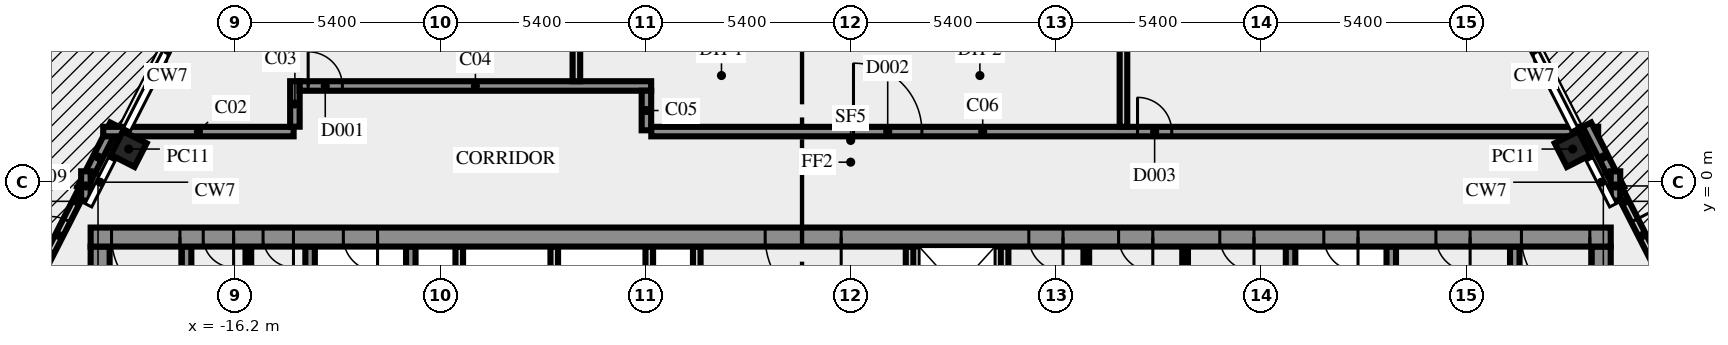
"""IFC4 building model, lengths in metres.
Left out: names, types, materials, properties, quantities, classifications, styles, units other than length and angle.
Written with IfcOpenShell. Run it as: python <this file> out.ifc"""

import sys

from ifc_helpers import new_model, si_unit, direction, frame, frame_2d, origin, origin_2d, place, context, subcontext, project, spatial, rectangle, extrude, element, fill, save


model = new_model("IFC4")
c1 = context("Model", 3, precision=1e-05, world=origin(), true_north=direction((0.0, 1.0)))
c2 = subcontext(c1, "Body", "Model", "MODEL_VIEW")
j1 = project(units=[si_unit("LENGTHUNIT", "METRE"), si_unit("PLANEANGLEUNIT", "RADIAN")], contexts=[c1])
p1 = place(None, origin())
s1 = spatial("IfcSite", under=j1, at=p1, CompositionType="ELEMENT")
p2 = place(p1, origin())
s2 = spatial("IfcBuilding", under=s1, at=p2, CompositionType="ELEMENT")
p3 = place(p2, frame((0.0, 0.0, 355.0)))
s3 = spatial("IfcBuildingStorey", under=s2, at=p3, CompositionType="ELEMENT", Elevation=355.0)
for number, where, z_axis, x_axis in (
    (1, (-18.998, 0.865, 0.0), (0.0, 0.0, 1.0), (-0.454, -0.891, 0.0)),
    (2, (18.998, 0.865, 0.0), (0.0, 0.0, 1.0), (-0.454, 0.891, 0.0)),
):
    element("IfcColumn", number, at=place(p3, frame(where, z_axis=z_axis, x_axis=x_axis)), inside=s3, PredefinedType="COLUMN", context=c2, shape_type="SweptSolid", body=[
        extrude(rectangle(XDim=0.7, YDim=0.7, at=origin_2d()), origin(), (0.0, 0.0, 1.0), 7.55),
    ])
p4 = place(p3, frame((-21.312, -2.355, 0.0), z_axis=(0.0, 0.0, 1.0), x_axis=(0.453964632037, 0.891019703968, 0.0)))
e3 = element("IfcWall", 3, at=p4, inside=s3, PredefinedType="SOLIDWALL", context=c2, shape_type="SweptSolid", body=[
    extrude(rectangle(XDim=2.354, YDim=0.2, at=frame_2d((1.177, 0.0))), origin(), (0.0, 0.0, 1.0), 7.55),
])
p5 = place(p4, frame((0.611, 0.0, 0.0)))
e4 = element("IfcOpeningElement", 4, at=p5, cuts=e3, PredefinedType="OPENING", context=c2, shape_type="SweptSolid", body=[
    extrude(rectangle(XDim=0.9, YDim=2.1, at=frame_2d((0.45, 1.05))), frame((0.0, 0.11, 0.0), z_axis=(0.0, -1.0, 0.0), x_axis=(1.0, 0.0, 0.0)), (0.0, 0.0, 1.0), 0.22),
])
p6 = place(p3, frame((20.244, -0.258, 0.0), z_axis=(0.0, 0.0, 1.0), x_axis=(0.453964632037, -0.891019703968, 0.0)))
e5 = element("IfcWall", 5, at=p6, inside=s3, PredefinedType="SOLIDWALL", context=c2, shape_type="SweptSolid", body=[
    extrude(rectangle(XDim=2.354, YDim=0.2, at=frame_2d((1.177, 0.0))), origin(), (0.0, 0.0, 1.0), 7.55),
])
p7 = place(p6, frame((0.843, 0.0, 0.0)))
e6 = element("IfcOpeningElement", 6, at=p7, cuts=e5, PredefinedType="OPENING", context=c2, shape_type="SweptSolid", body=[
    extrude(rectangle(XDim=0.9, YDim=2.1, at=frame_2d((0.45, 1.05))), frame((0.0, 0.11, 0.0), z_axis=(0.0, -1.0, 0.0), x_axis=(1.0, 0.0, 0.0)), (0.0, 0.0, 1.0), 0.22),
])
for number, where, z_axis, x_axis in (
    (7, (-19.75, -10.5, 0.0), (0.0, 0.0, 1.0), (0.0, 1.0, 0.0)),
    (8, (19.75, -10.5, 0.0), (0.0, 0.0, 1.0), (0.0, 1.0, 0.0)),
):
    element("IfcWall", number, at=place(p3, frame(where, z_axis=z_axis, x_axis=x_axis)), inside=s3, PredefinedType="SHEAR", context=c2, shape_type="SweptSolid", body=[
        extrude(rectangle(XDim=8.8, YDim=0.5, at=frame_2d((4.4, 0.0))), origin(), (0.0, 0.0, 1.0), 7.55),
    ])
for number, where, z_axis, x_axis in (
    (9, (-17.475, -6.0, 0.0), (0.0, 0.0, 1.0), (0.0, 1.0, 0.0)),
    (10, (-14.225, -6.0, 0.0), (0.0, 0.0, 1.0), (0.0, 1.0, 0.0)),
    (11, (14.225, -6.0, 0.0), (0.0, 0.0, 1.0), (0.0, 1.0, 0.0)),
    (12, (17.475, -6.0, 0.0), (0.0, 0.0, 1.0), (0.0, 1.0, 0.0)),
):
    element("IfcWall", number, at=place(p3, frame(where, z_axis=z_axis, x_axis=x_axis)), inside=s3, PredefinedType="SHEAR", context=c2, shape_type="SweptSolid", body=[
        extrude(rectangle(XDim=4.3, YDim=0.25, at=frame_2d((2.15, 0.0))), origin(), (0.0, 0.0, 1.0), 7.55),
    ])
p8 = place(p3, frame((-11.575, -4.0, 0.0), z_axis=(0.0, 0.0, 1.0), x_axis=(0.0, 1.0, 0.0)))
e13 = element("IfcWall", 13, at=p8, inside=s3, PredefinedType="SHEAR", context=c2, shape_type="SweptSolid", body=[
    extrude(rectangle(XDim=2.3, YDim=0.25, at=frame_2d((1.15, 0.0))), origin(), (0.0, 0.0, 1.0), 7.55),
])
for number, where, z_axis, x_axis in (
    (14, (-10.3, -4.0, 0.0), (0.0, 0.0, 1.0), (0.0, 1.0, 0.0)),
    (15, (-7.8, -4.0, 0.0), (0.0, 0.0, 1.0), (0.0, 1.0, 0.0)),
    (16, (-5.3, -4.0, 0.0), (0.0, 0.0, 1.0), (0.0, 1.0, 0.0)),
    (17, (-4.05, -4.0, 0.0), (0.0, 0.0, 1.0), (0.0, 1.0, 0.0)),
    (18, (1.55, -4.0, 0.0), (0.0, 0.0, 1.0), (0.0, 1.0, 0.0)),
    (19, (4.05, -4.0, 0.0), (0.0, 0.0, 1.0), (0.0, 1.0, 0.0)),
):
    element("IfcWall", number, at=place(p3, frame(where, z_axis=z_axis, x_axis=x_axis)), inside=s3, PredefinedType="SOLIDWALL", context=c2, shape_type="SweptSolid", body=[
        extrude(rectangle(XDim=2.3, YDim=0.2, at=frame_2d((1.15, 0.0))), origin(), (0.0, 0.0, 1.0), 7.55),
    ])
for number, where, z_axis, x_axis in (
    (20, (6.2, -4.0, 0.0), (0.0, 0.0, 1.0), (0.0, 1.0, 0.0)),
    (21, (8.8, -4.0, 0.0), (0.0, 0.0, 1.0), (0.0, 1.0, 0.0)),
):
    element("IfcWall", number, at=place(p3, frame(where, z_axis=z_axis, x_axis=x_axis)), inside=s3, PredefinedType="PARTITIONING", context=c2, shape_type="SweptSolid", body=[
        extrude(rectangle(XDim=2.3, YDim=0.15, at=frame_2d((1.15, 0.0))), origin(), (0.0, 0.0, 1.0), 7.55),
    ])
p9 = place(p3, frame((11.575, -4.0, 0.0), z_axis=(0.0, 0.0, 1.0), x_axis=(0.0, 1.0, 0.0)))
e22 = element("IfcWall", 22, at=p9, inside=s3, PredefinedType="SHEAR", context=c2, shape_type="SweptSolid", body=[
    extrude(rectangle(XDim=2.3, YDim=0.25, at=frame_2d((1.15, 0.0))), origin(), (0.0, 0.0, 1.0), 7.55),
])
p10 = place(p3, frame((-15.85, -3.35, 0.0), z_axis=(0.0, 0.0, 1.0), x_axis=(0.0, 1.0, 0.0)))
e23 = element("IfcWall", 23, at=p10, inside=s3, PredefinedType="PARTITIONING", context=c2, shape_type="SweptSolid", body=[
    extrude(rectangle(XDim=1.65, YDim=0.15, at=frame_2d((0.825, 0.0))), origin(), (0.0, 0.0, 1.0), 7.55),
])
p11 = place(p3, frame((20.0, -1.45, 0.0), z_axis=(0.0, 0.0, 1.0), x_axis=(-1.0, 0.0, 0.0)))
e24 = element("IfcWall", 24, at=p11, inside=s3, PredefinedType="SHEAR", context=c2, shape_type="SweptSolid", body=[
    extrude(rectangle(XDim=40.0, YDim=0.5, at=frame_2d((20.0, 0.0))), origin(), (0.0, 0.0, 1.0), 7.55),
])
p12 = place(p11, frame((37.65, 0.0, 0.0)))
e25 = element("IfcOpeningElement", 25, at=p12, cuts=e24, PredefinedType="OPENING", context=c2, shape_type="SweptSolid", body=[
    extrude(rectangle(XDim=1.8, YDim=2.1, at=frame_2d((0.9, 1.05))), frame((0.0, 0.26, 0.0), z_axis=(0.0, -1.0, 0.0), x_axis=(1.0, 0.0, 0.0)), (0.0, 0.0, 1.0), 0.52),
])
p13 = place(p11, frame((36.238, 0.0, 0.0)))
e26 = element("IfcOpeningElement", 26, at=p13, cuts=e24, PredefinedType="OPENING", context=c2, shape_type="SweptSolid", body=[
    extrude(rectangle(XDim=0.8, YDim=2.1, at=frame_2d((0.4, 1.05))), frame((0.0, 0.26, 0.0), z_axis=(0.0, -1.0, 0.0), x_axis=(1.0, 0.0, 0.0)), (0.0, 0.0, 1.0), 0.52),
])
p14 = place(p11, frame((34.663, 0.0, 0.0)))
e27 = element("IfcOpeningElement", 27, at=p14, cuts=e24, PredefinedType="OPENING", context=c2, shape_type="SweptSolid", body=[
    extrude(rectangle(XDim=0.8, YDim=2.1, at=frame_2d((0.4, 1.05))), frame((0.0, 0.26, 0.0), z_axis=(0.0, -1.0, 0.0), x_axis=(1.0, 0.0, 0.0)), (0.0, 0.0, 1.0), 0.52),
])
p15 = place(p11, frame((32.45, 0.0, 0.0)))
e28 = element("IfcOpeningElement", 28, at=p15, cuts=e24, PredefinedType="OPENING", context=c2, shape_type="SweptSolid", body=[
    extrude(rectangle(XDim=0.9, YDim=2.1, at=frame_2d((0.45, 1.05))), frame((0.0, 0.26, 0.0), z_axis=(0.0, -1.0, 0.0), x_axis=(1.0, 0.0, 0.0)), (0.0, 0.0, 1.0), 0.52),
])
p16 = place(p11, frame((20.25, 0.0, 0.0)))
e29 = element("IfcOpeningElement", 29, at=p16, cuts=e24, PredefinedType="OPENING", context=c2, shape_type="SweptSolid", body=[
    extrude(rectangle(XDim=2.0, YDim=2.1, at=frame_2d((1.0, 1.05))), frame((0.0, 0.26, 0.0), z_axis=(0.0, -1.0, 0.0), x_axis=(1.0, 0.0, 0.0)), (0.0, 0.0, 1.0), 0.52),
])
p17 = place(p11, frame((14.413, 0.0, 0.0)))
e30 = element("IfcOpeningElement", 30, at=p17, cuts=e24, PredefinedType="OPENING", context=c2, shape_type="SweptSolid", body=[
    extrude(rectangle(XDim=0.9, YDim=2.1, at=frame_2d((0.45, 1.05))), frame((0.0, 0.26, 0.0), z_axis=(0.0, -1.0, 0.0), x_axis=(1.0, 0.0, 0.0)), (0.0, 0.0, 1.0), 0.52),
])
p18 = place(p11, frame((12.05, 0.0, 0.0)))
e31 = element("IfcOpeningElement", 31, at=p18, cuts=e24, PredefinedType="OPENING", context=c2, shape_type="SweptSolid", body=[
    extrude(rectangle(XDim=0.9, YDim=2.1, at=frame_2d((0.45, 1.05))), frame((0.0, 0.26, 0.0), z_axis=(0.0, -1.0, 0.0), x_axis=(1.0, 0.0, 0.0)), (0.0, 0.0, 1.0), 0.52),
])
p19 = place(p11, frame((9.387, 0.0, 0.0)))
e32 = element("IfcOpeningElement", 32, at=p19, cuts=e24, PredefinedType="OPENING", context=c2, shape_type="SweptSolid", body=[
    extrude(rectangle(XDim=0.9, YDim=2.1, at=frame_2d((0.45, 1.05))), frame((0.0, 0.26, 0.0), z_axis=(0.0, -1.0, 0.0), x_axis=(1.0, 0.0, 0.0)), (0.0, 0.0, 1.0), 0.52),
])
p20 = place(p11, frame((6.65, 0.0, 0.0)))
e33 = element("IfcOpeningElement", 33, at=p20, cuts=e24, PredefinedType="OPENING", context=c2, shape_type="SweptSolid", body=[
    extrude(rectangle(XDim=0.9, YDim=2.1, at=frame_2d((0.45, 1.05))), frame((0.0, 0.26, 0.0), z_axis=(0.0, -1.0, 0.0), x_axis=(1.0, 0.0, 0.0)), (0.0, 0.0, 1.0), 0.52),
])
p21 = place(p11, frame((3.7, 0.0, 0.0)))
e34 = element("IfcOpeningElement", 34, at=p21, cuts=e24, PredefinedType="OPENING", context=c2, shape_type="SweptSolid", body=[
    extrude(rectangle(XDim=0.9, YDim=2.1, at=frame_2d((0.45, 1.05))), frame((0.0, 0.26, 0.0), z_axis=(0.0, -1.0, 0.0), x_axis=(1.0, 0.0, 0.0)), (0.0, 0.0, 1.0), 0.52),
])
p22 = place(p11, frame((0.55, 0.0, 0.0)))
e35 = element("IfcOpeningElement", 35, at=p22, cuts=e24, PredefinedType="OPENING", context=c2, shape_type="SweptSolid", body=[
    extrude(rectangle(XDim=1.8, YDim=2.1, at=frame_2d((0.9, 1.05))), frame((0.0, 0.26, 0.0), z_axis=(0.0, -1.0, 0.0), x_axis=(1.0, 0.0, 0.0)), (0.0, 0.0, 1.0), 0.52),
])
p23 = place(p3, frame((-20.239, -0.193, 0.0), z_axis=(0.0, 0.0, 1.0), x_axis=(0.454061930084, 0.890970125003, 0.0)))
e36 = element("IfcWall", 36, at=p23, inside=s3, PredefinedType="SOLIDWALL", context=c2, shape_type="SweptSolid", body=[
    extrude(rectangle(XDim=1.907, YDim=0.25, at=frame_2d((0.954, 0.0))), origin(), (0.0, 0.0, 1.0), 7.55),
])
p24 = place(p3, frame((-19.669, 1.325, 0.0), z_axis=(0.0, 0.0, 1.0), x_axis=(1.0, 0.0, 0.0)))
e37 = element("IfcWall", 37, at=p24, inside=s3, PredefinedType="SOLIDWALL", context=c2, shape_type="SweptSolid", body=[
    extrude(rectangle(XDim=5.01, YDim=0.25, at=frame_2d((2.505, 0.0))), origin(), (0.0, 0.0, 1.0), 7.55),
])
p25 = place(p3, frame((-14.625, 1.454, 0.0), z_axis=(0.0, 0.0, 1.0), x_axis=(0.0, 1.0, 0.0)))
e38 = element("IfcWall", 38, at=p25, inside=s3, PredefinedType="SOLIDWALL", context=c2, shape_type="SweptSolid", body=[
    extrude(rectangle(XDim=1.196, YDim=0.25, at=frame_2d((0.598, 0.0))), origin(), (0.0, 0.0, 1.0), 7.55),
])
p26 = place(p3, frame((-14.5, 2.525, 0.0), z_axis=(0.0, 0.0, 1.0), x_axis=(1.0, 0.0, 0.0)))
e39 = element("IfcWall", 39, at=p26, inside=s3, PredefinedType="SOLIDWALL", context=c2, shape_type="SweptSolid", body=[
    extrude(rectangle(XDim=9.25, YDim=0.25, at=frame_2d((4.625, 0.0))), origin(), (0.0, 0.0, 1.0), 7.55),
])
p27 = place(p26, frame((0.224, 0.0, 0.0)))
e40 = element("IfcOpeningElement", 40, at=p27, cuts=e39, PredefinedType="OPENING", context=c2, shape_type="SweptSolid", body=[
    extrude(rectangle(XDim=0.9, YDim=2.1, at=frame_2d((0.45, 1.05))), frame((0.0, 0.135, 0.0), z_axis=(0.0, -1.0, 0.0), x_axis=(1.0, 0.0, 0.0)), (0.0, 0.0, 1.0), 0.27),
])
p28 = place(p3, frame((-5.375, 2.4, 0.0), z_axis=(0.0, 0.0, 1.0), x_axis=(0.0, -1.0, 0.0)))
e41 = element("IfcWall", 41, at=p28, inside=s3, PredefinedType="SOLIDWALL", context=c2, shape_type="SweptSolid", body=[
    extrude(rectangle(XDim=1.041, YDim=0.25, at=frame_2d((0.521, 0.0))), origin(), (0.0, 0.0, 1.0), 7.55),
])
p29 = place(p3, frame((-5.246, 1.325, 0.0), z_axis=(0.0, 0.0, 1.0), x_axis=(1.0, 0.0, 0.0)))
e42 = element("IfcWall", 42, at=p29, inside=s3, PredefinedType="SOLIDWALL", context=c2, shape_type="SweptSolid", body=[
    extrude(rectangle(XDim=24.916, YDim=0.25, at=frame_2d((12.458, 0.0))), origin(), (0.0, 0.0, 1.0), 7.55),
])
p30 = place(p29, frame((5.32, 0.0, 0.0)))
e43 = element("IfcOpeningElement", 43, at=p30, cuts=e42, PredefinedType="OPENING", context=c2, shape_type="SweptSolid", body=[
    extrude(rectangle(XDim=1.8, YDim=2.1, at=frame_2d((0.9, 1.05))), frame((0.0, 0.135, 0.0), z_axis=(0.0, -1.0, 0.0), x_axis=(1.0, 0.0, 0.0)), (0.0, 0.0, 1.0), 0.27),
])
p31 = place(p29, frame((12.794, 0.0, 0.0)))
e44 = element("IfcOpeningElement", 44, at=p31, cuts=e42, PredefinedType="OPENING", context=c2, shape_type="SweptSolid", body=[
    extrude(rectangle(XDim=0.9, YDim=2.1, at=frame_2d((0.45, 1.05))), frame((0.0, 0.135, 0.0), z_axis=(0.0, -1.0, 0.0), x_axis=(1.0, 0.0, 0.0)), (0.0, 0.0, 1.0), 0.27),
])
p32 = place(p3, frame((19.373, 1.507, 0.0), z_axis=(0.0, 0.0, 1.0), x_axis=(0.454061930084, -0.890970125003, 0.0)))
e45 = element("IfcWall", 45, at=p32, inside=s3, PredefinedType="SOLIDWALL", context=c2, shape_type="SweptSolid", body=[
    extrude(rectangle(XDim=1.907, YDim=0.25, at=frame_2d((0.954, 0.0))), origin(), (0.0, 0.0, 1.0), 7.55),
])
for number, where, z_axis, x_axis in (
    (46, (20.125, 0.28, 0.0), (0.0, 0.0, 1.0), (0.0, -1.0, 0.0)),
    (47, (-20.125, -0.491, 0.0), (0.0, 0.0, 1.0), (0.0, 1.0, 0.0)),
):
    element("IfcWall", number, at=place(p3, frame(where, z_axis=z_axis, x_axis=x_axis)), inside=s3, PredefinedType="SOLIDWALL", context=c2, shape_type="SweptSolid", body=[
        extrude(rectangle(XDim=0.771, YDim=0.25, at=frame_2d((0.386, 0.0))), origin(), (0.0, 0.0, 1.0), 7.55),
    ])
p33 = place(p3, frame((-7.218, 2.65, 0.0), z_axis=(0.0, 0.0, 1.0), x_axis=(0.0, 1.0, 0.0)))
e48 = element("IfcWall", 48, at=p33, inside=s3, PredefinedType="SOLIDWALL", context=c2, shape_type="SweptSolid", body=[
    extrude(rectangle(XDim=8.026, YDim=0.2, at=frame_2d((4.013, 0.0))), origin(), (0.0, 0.0, 1.0), 5.75),
])
p34 = place(p3, frame((7.178, 1.45, 0.0), z_axis=(0.0, 0.0, 1.0), x_axis=(0.0, 1.0, 0.0)))
e49 = element("IfcWall", 49, at=p34, inside=s3, PredefinedType="SOLIDWALL", context=c2, shape_type="SweptSolid", body=[
    extrude(rectangle(XDim=9.226, YDim=0.2, at=frame_2d((4.613, 0.0))), origin(), (0.0, 0.0, 1.0), 5.75),
])
p35 = place(p5, origin())
e50 = element("IfcDoor", 50, at=p35, inside=s3, OperationType="SINGLE_SWING_RIGHT", PredefinedType="DOOR", context=c2, shape_type="SweptSolid", body=[
    extrude(rectangle(XDim=0.9, YDim=2.1, at=frame_2d((0.45, 1.05))), frame((0.0, 0.025, 0.0), z_axis=(0.0, -1.0, 0.0), x_axis=(1.0, 0.0, 0.0)), (0.0, 0.0, 1.0), 0.05),
])
fill(e4, e50)
p36 = place(p7, origin())
e51 = element("IfcDoor", 51, at=p36, inside=s3, OperationType="SINGLE_SWING_RIGHT", PredefinedType="DOOR", context=c2, shape_type="SweptSolid", body=[
    extrude(rectangle(XDim=0.9, YDim=2.1, at=frame_2d((0.45, 1.05))), frame((0.0, 0.025, 0.0), z_axis=(0.0, -1.0, 0.0), x_axis=(1.0, 0.0, 0.0)), (0.0, 0.0, 1.0), 0.05),
])
fill(e6, e51)
p37 = place(p12, origin())
e52 = element("IfcDoor", 52, at=p37, inside=s3, OperationType="DOUBLE_DOOR_SINGLE_SWING", PredefinedType="DOOR", context=c2, shape_type="SweptSolid", body=[
    extrude(rectangle(XDim=1.8, YDim=2.1, at=frame_2d((0.9, 1.05))), frame((0.0, 0.025, 0.0), z_axis=(0.0, -1.0, 0.0), x_axis=(1.0, 0.0, 0.0)), (0.0, 0.0, 1.0), 0.05),
])
fill(e25, e52)
p38 = place(p13, origin())
e53 = element("IfcDoor", 53, at=p38, inside=s3, OperationType="SINGLE_SWING_RIGHT", PredefinedType="DOOR", context=c2, shape_type="SweptSolid", body=[
    extrude(rectangle(XDim=0.8, YDim=2.1, at=frame_2d((0.4, 1.05))), frame((0.0, 0.025, 0.0), z_axis=(0.0, -1.0, 0.0), x_axis=(1.0, 0.0, 0.0)), (0.0, 0.0, 1.0), 0.05),
])
fill(e26, e53)
p39 = place(p14, origin())
e54 = element("IfcDoor", 54, at=p39, inside=s3, OperationType="SINGLE_SWING_RIGHT", PredefinedType="DOOR", context=c2, shape_type="SweptSolid", body=[
    extrude(rectangle(XDim=0.8, YDim=2.1, at=frame_2d((0.4, 1.05))), frame((0.0, 0.025, 0.0), z_axis=(0.0, -1.0, 0.0), x_axis=(1.0, 0.0, 0.0)), (0.0, 0.0, 1.0), 0.05),
])
fill(e27, e54)
p40 = place(p15, origin())
e55 = element("IfcDoor", 55, at=p40, inside=s3, OperationType="SINGLE_SWING_RIGHT", PredefinedType="DOOR", context=c2, shape_type="SweptSolid", body=[
    extrude(rectangle(XDim=0.9, YDim=2.1, at=frame_2d((0.45, 1.05))), frame((0.0, 0.025, 0.0), z_axis=(0.0, -1.0, 0.0), x_axis=(1.0, 0.0, 0.0)), (0.0, 0.0, 1.0), 0.05),
])
fill(e28, e55)
p41 = place(p16, origin())
e56 = element("IfcDoor", 56, at=p41, inside=s3, OperationType="DOUBLE_DOOR_SINGLE_SWING", PredefinedType="DOOR", context=c2, shape_type="SweptSolid", body=[
    extrude(rectangle(XDim=2.0, YDim=2.1, at=frame_2d((1.0, 1.05))), frame((0.0, 0.025, 0.0), z_axis=(0.0, -1.0, 0.0), x_axis=(1.0, 0.0, 0.0)), (0.0, 0.0, 1.0), 0.05),
])
fill(e29, e56)
p42 = place(p17, origin())
e57 = element("IfcDoor", 57, at=p42, inside=s3, OperationType="SINGLE_SWING_LEFT", PredefinedType="DOOR", context=c2, shape_type="SweptSolid", body=[
    extrude(rectangle(XDim=0.9, YDim=2.1, at=frame_2d((0.45, 1.05))), frame((0.0, 0.025, 0.0), z_axis=(0.0, -1.0, 0.0), x_axis=(1.0, 0.0, 0.0)), (0.0, 0.0, 1.0), 0.05),
])
fill(e30, e57)
p43 = place(p18, origin())
e58 = element("IfcDoor", 58, at=p43, inside=s3, OperationType="SINGLE_SWING_LEFT", PredefinedType="DOOR", context=c2, shape_type="SweptSolid", body=[
    extrude(rectangle(XDim=0.9, YDim=2.1, at=frame_2d((0.45, 1.05))), frame((0.0, 0.025, 0.0), z_axis=(0.0, -1.0, 0.0), x_axis=(1.0, 0.0, 0.0)), (0.0, 0.0, 1.0), 0.05),
])
fill(e31, e58)
p44 = place(p19, origin())
e59 = element("IfcDoor", 59, at=p44, inside=s3, OperationType="SINGLE_SWING_LEFT", PredefinedType="DOOR", context=c2, shape_type="SweptSolid", body=[
    extrude(rectangle(XDim=0.9, YDim=2.1, at=frame_2d((0.45, 1.05))), frame((0.0, 0.025, 0.0), z_axis=(0.0, -1.0, 0.0), x_axis=(1.0, 0.0, 0.0)), (0.0, 0.0, 1.0), 0.05),
])
fill(e32, e59)
p45 = place(p20, origin())
e60 = element("IfcDoor", 60, at=p45, inside=s3, OperationType="SINGLE_SWING_LEFT", PredefinedType="DOOR", context=c2, shape_type="SweptSolid", body=[
    extrude(rectangle(XDim=0.9, YDim=2.1, at=frame_2d((0.45, 1.05))), frame((0.0, 0.025, 0.0), z_axis=(0.0, -1.0, 0.0), x_axis=(1.0, 0.0, 0.0)), (0.0, 0.0, 1.0), 0.05),
])
fill(e33, e60)
p46 = place(p21, origin())
e61 = element("IfcDoor", 61, at=p46, inside=s3, OperationType="SINGLE_SWING_LEFT", PredefinedType="DOOR", context=c2, shape_type="SweptSolid", body=[
    extrude(rectangle(XDim=0.9, YDim=2.1, at=frame_2d((0.45, 1.05))), frame((0.0, 0.025, 0.0), z_axis=(0.0, -1.0, 0.0), x_axis=(1.0, 0.0, 0.0)), (0.0, 0.0, 1.0), 0.05),
])
fill(e34, e61)
p47 = place(p22, origin())
e62 = element("IfcDoor", 62, at=p47, inside=s3, OperationType="DOUBLE_DOOR_SINGLE_SWING", PredefinedType="DOOR", context=c2, shape_type="SweptSolid", body=[
    extrude(rectangle(XDim=1.8, YDim=2.1, at=frame_2d((0.9, 1.05))), frame((0.0, 0.025, 0.0), z_axis=(0.0, -1.0, 0.0), x_axis=(1.0, 0.0, 0.0)), (0.0, 0.0, 1.0), 0.05),
])
fill(e35, e62)
p48 = place(p27, origin())
e63 = element("IfcDoor", 63, at=p48, inside=s3, OperationType="SINGLE_SWING_LEFT", PredefinedType="DOOR", context=c2, shape_type="SweptSolid", body=[
    extrude(rectangle(XDim=0.9, YDim=2.1, at=frame_2d((0.45, 1.05))), frame((0.0, 0.025, 0.0), z_axis=(0.0, -1.0, 0.0), x_axis=(1.0, 0.0, 0.0)), (0.0, 0.0, 1.0), 0.05),
])
fill(e40, e63)
p49 = place(p30, origin())
e64 = element("IfcDoor", 64, at=p49, inside=s3, OperationType="DOUBLE_DOOR_SINGLE_SWING", PredefinedType="DOOR", context=c2, shape_type="SweptSolid", body=[
    extrude(rectangle(XDim=1.8, YDim=2.1, at=frame_2d((0.9, 1.05))), frame((0.0, 0.025, 0.0), z_axis=(0.0, -1.0, 0.0), x_axis=(1.0, 0.0, 0.0)), (0.0, 0.0, 1.0), 0.05),
])
fill(e43, e64)
p50 = place(p31, origin())
e65 = element("IfcDoor", 65, at=p50, inside=s3, OperationType="SINGLE_SWING_LEFT", PredefinedType="DOOR", context=c2, shape_type="SweptSolid", body=[
    extrude(rectangle(XDim=0.9, YDim=2.1, at=frame_2d((0.45, 1.05))), frame((0.0, 0.025, 0.0), z_axis=(0.0, -1.0, 0.0), x_axis=(1.0, 0.0, 0.0)), (0.0, 0.0, 1.0), 0.05),
])
fill(e44, e65)
save(model, sys.argv[1])
